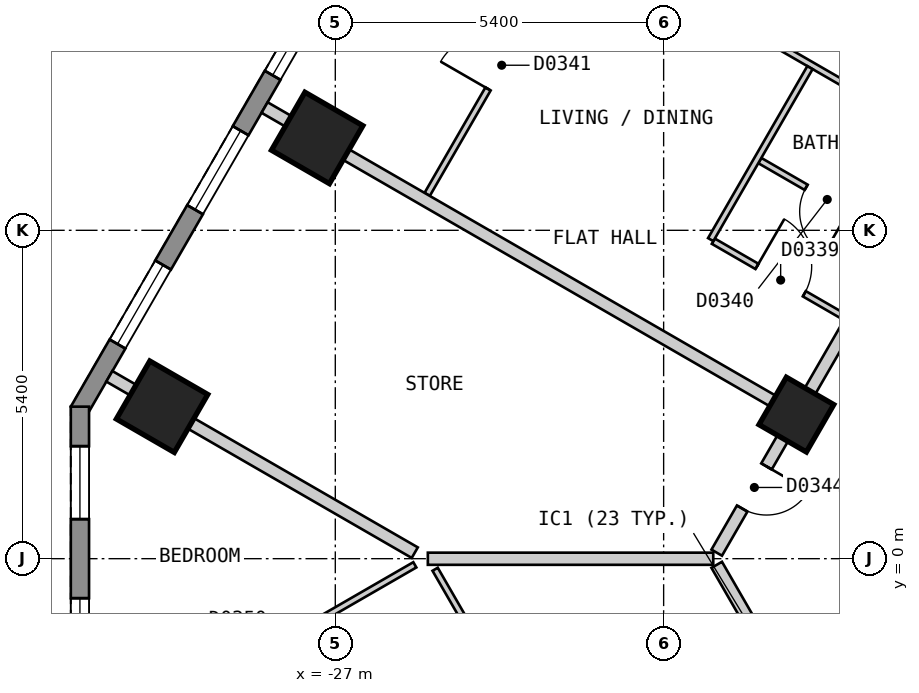
"""IFC4 building model, lengths in metres.
Left out: names, types, materials, properties, quantities, classifications, styles, units other than length and angle.
Written with IfcOpenShell. Run it as: python <this file> out.ifc"""

import sys

from ifc_helpers import new_model, si_unit, direction, frame, frame_2d, origin, origin_2d, place, context, subcontext, project, spatial, polyline, rectangle, outline, extrude, element, fill, save


model = new_model("IFC4")
c1 = context("Model", 3, precision=1e-05, world=origin(), true_north=direction((0.0, 1.0)))
c2 = subcontext(c1, "Body", "Model", "MODEL_VIEW")
j1 = project(units=[si_unit("LENGTHUNIT", "METRE"), si_unit("PLANEANGLEUNIT", "RADIAN")], contexts=[c1])
p1 = place(None, origin())
s1 = spatial("IfcSite", under=j1, at=p1, CompositionType="ELEMENT")
p2 = place(p1, origin())
s2 = spatial("IfcBuilding", under=s1, at=p2, CompositionType="ELEMENT")
p3 = place(p2, frame((0.0, 0.0, 59.4)))
s3 = spatial("IfcBuildingStorey", under=s2, at=p3, CompositionType="ELEMENT", Elevation=59.4)
for number, where, z_axis, x_axis in (
    (1, (-27.298, 6.919, 0.0), (0.0, 0.0, 1.0), (-0.5, -0.866, 0.0)),
    (2, (-29.849, 2.499, 0.0), (0.0, 0.0, 1.0), (-0.5, -0.866, 0.0)),
):
    element("IfcColumn", number, at=place(p3, frame(where, z_axis=z_axis, x_axis=x_axis)), inside=s3, PredefinedType="COLUMN", context=c2, shape_type="SweptSolid", body=[
        extrude(rectangle(XDim=1.1, YDim=1.1, at=origin_2d()), origin(), (0.0, 0.0, 1.0), 3.0),
    ])
p4 = place(p3, frame((-19.417, 2.369, 0.0), z_axis=(0.0, 0.0, 1.0), x_axis=(-0.499984884929, -0.866034130299, 0.0)))
e3 = element("IfcColumn", 3, at=p4, inside=s3, PredefinedType="COLUMN", context=c2, shape_type="SweptSolid", body=[
    extrude(rectangle(XDim=0.9, YDim=0.9, at=origin_2d()), origin(), (0.0, 0.0, 1.0), 3.0),
])
p5 = place(p3, frame((-17.71, 25.825, 0.0), z_axis=(0.0, 0.0, 1.0), x_axis=(-0.500001938803, -0.866024284413, 0.0)))
e4 = element("IfcWall", 4, at=p5, inside=s3, PredefinedType="SOLIDWALL", context=c2, shape_type="SweptSolid", body=[
    extrude(outline(polyline([(0.0, -0.15), (27.02, -0.15), (26.94, 0.15), (0.08, 0.15), (0.0, -0.15)])), origin(), (0.0, 0.0, 1.0), 2.6),
])
p6 = place(p5, frame((1.277, 0.0, 0.15)))
e5 = element("IfcOpeningElement", 5, at=p6, cuts=e4, PredefinedType="OPENING", context=c2, shape_type="SweptSolid", body=[
    extrude(rectangle(XDim=1.5, YDim=2.1, at=frame_2d((0.75, 1.05))), frame((0.0, 0.16, 0.0), z_axis=(0.0, -1.0, 0.0), x_axis=(1.0, 0.0, 0.0)), (0.0, 0.0, 1.0), 0.32),
])
p7 = place(p5, frame((3.829, 0.0, 0.15)))
e6 = element("IfcOpeningElement", 6, at=p7, cuts=e4, PredefinedType="OPENING", context=c2, shape_type="SweptSolid", body=[
    extrude(rectangle(XDim=1.5, YDim=2.1, at=frame_2d((0.75, 1.05))), frame((0.0, 0.16, 0.0), z_axis=(0.0, -1.0, 0.0), x_axis=(1.0, 0.0, 0.0)), (0.0, 0.0, 1.0), 0.32),
])
p8 = place(p5, frame((6.382, 0.0, 0.15)))
e7 = element("IfcOpeningElement", 7, at=p8, cuts=e4, PredefinedType="OPENING", context=c2, shape_type="SweptSolid", body=[
    extrude(rectangle(XDim=1.5, YDim=2.1, at=frame_2d((0.75, 1.05))), frame((0.0, 0.16, 0.0), z_axis=(0.0, -1.0, 0.0), x_axis=(1.0, 0.0, 0.0)), (0.0, 0.0, 1.0), 0.32),
])
p9 = place(p5, frame((8.933, 0.0, 0.15)))
e8 = element("IfcOpeningElement", 8, at=p9, cuts=e4, PredefinedType="OPENING", context=c2, shape_type="SweptSolid", body=[
    extrude(rectangle(XDim=1.5, YDim=2.1, at=frame_2d((0.75, 1.05))), frame((0.0, 0.16, 0.0), z_axis=(0.0, -1.0, 0.0), x_axis=(1.0, 0.0, 0.0)), (0.0, 0.0, 1.0), 0.32),
])
p10 = place(p5, frame((11.485, 0.0, 0.15)))
e9 = element("IfcOpeningElement", 9, at=p10, cuts=e4, PredefinedType="OPENING", context=c2, shape_type="SweptSolid", body=[
    extrude(rectangle(XDim=1.5, YDim=2.1, at=frame_2d((0.75, 1.05))), frame((0.0, 0.16, 0.0), z_axis=(0.0, -1.0, 0.0), x_axis=(1.0, 0.0, 0.0)), (0.0, 0.0, 1.0), 0.32),
])
p11 = place(p5, frame((14.037, 0.0, 0.15)))
e10 = element("IfcOpeningElement", 10, at=p11, cuts=e4, PredefinedType="OPENING", context=c2, shape_type="SweptSolid", body=[
    extrude(rectangle(XDim=1.5, YDim=2.1, at=frame_2d((0.75, 1.05))), frame((0.0, 0.16, 0.0), z_axis=(0.0, -1.0, 0.0), x_axis=(1.0, 0.0, 0.0)), (0.0, 0.0, 1.0), 0.32),
])
p12 = place(p5, frame((16.589, 0.0, 0.15)))
e11 = element("IfcOpeningElement", 11, at=p12, cuts=e4, PredefinedType="OPENING", context=c2, shape_type="SweptSolid", body=[
    extrude(rectangle(XDim=1.5, YDim=2.1, at=frame_2d((0.75, 1.05))), frame((0.0, 0.16, 0.0), z_axis=(0.0, -1.0, 0.0), x_axis=(1.0, 0.0, 0.0)), (0.0, 0.0, 1.0), 0.32),
])
p13 = place(p5, frame((19.141, 0.0, 0.15)))
e12 = element("IfcOpeningElement", 12, at=p13, cuts=e4, PredefinedType="OPENING", context=c2, shape_type="SweptSolid", body=[
    extrude(rectangle(XDim=1.5, YDim=2.1, at=frame_2d((0.75, 1.05))), frame((0.0, 0.16, 0.0), z_axis=(0.0, -1.0, 0.0), x_axis=(1.0, 0.0, 0.0)), (0.0, 0.0, 1.0), 0.32),
])
p14 = place(p5, frame((21.693, 0.0, 0.15)))
e13 = element("IfcOpeningElement", 13, at=p14, cuts=e4, PredefinedType="OPENING", context=c2, shape_type="SweptSolid", body=[
    extrude(rectangle(XDim=1.5, YDim=2.1, at=frame_2d((0.75, 1.05))), frame((0.0, 0.16, 0.0), z_axis=(0.0, -1.0, 0.0), x_axis=(1.0, 0.0, 0.0)), (0.0, 0.0, 1.0), 0.32),
])
p15 = place(p5, frame((24.244, 0.0, 0.15)))
e14 = element("IfcOpeningElement", 14, at=p15, cuts=e4, PredefinedType="OPENING", context=c2, shape_type="SweptSolid", body=[
    extrude(rectangle(XDim=1.5, YDim=2.1, at=frame_2d((0.75, 1.05))), frame((0.0, 0.16, 0.0), z_axis=(0.0, -1.0, 0.0), x_axis=(1.0, 0.0, 0.0)), (0.0, 0.0, 1.0), 0.32),
])
p16 = place(p3, frame((-31.2, 2.5, 0.0), z_axis=(0.0, 0.0, 1.0), x_axis=(0.0, -1.0, 0.0)))
e15 = element("IfcWall", 15, at=p16, inside=s3, PredefinedType="SOLIDWALL", context=c2, shape_type="SweptSolid", body=[
    extrude(outline(polyline([(0.0, -0.15), (5.0, -0.15), (4.92, 0.15), (0.08, 0.15), (0.0, -0.15)])), origin(), (0.0, 0.0, 1.0), 2.6),
])
p17 = place(p16, frame((0.65, 0.0, 0.15)))
e16 = element("IfcOpeningElement", 16, at=p17, cuts=e15, PredefinedType="OPENING", context=c2, shape_type="SweptSolid", body=[
    extrude(rectangle(XDim=1.2, YDim=2.1, at=frame_2d((0.6, 1.05))), frame((0.0, 0.16, 0.0), z_axis=(0.0, -1.0, 0.0), x_axis=(1.0, 0.0, 0.0)), (0.0, 0.0, 1.0), 0.32),
])
p18 = place(p16, frame((3.15, 0.0, 0.15)))
e17 = element("IfcOpeningElement", 17, at=p18, cuts=e15, PredefinedType="OPENING", context=c2, shape_type="SweptSolid", body=[
    extrude(rectangle(XDim=1.2, YDim=2.1, at=frame_2d((0.6, 1.05))), frame((0.0, 0.16, 0.0), z_axis=(0.0, -1.0, 0.0), x_axis=(1.0, 0.0, 0.0)), (0.0, 0.0, 1.0), 0.32),
])
p19 = place(p3, frame((-20.727, -0.101, 0.0), z_axis=(0.0, 0.0, 1.0), x_axis=(0.500049702773, -0.865996705973, 0.0)))
e18 = element("IfcWall", 18, at=p19, inside=s3, PredefinedType="PARTITIONING", context=c2, shape_type="SweptSolid", body=[
    extrude(rectangle(XDim=7.211, YDim=0.2, at=frame_2d((3.605, 0.0))), origin(), (0.0, 0.0, 1.0), 2.6),
])
p20 = place(p19, frame((5.654, 0.0, 0.0)))
e19 = element("IfcOpeningElement", 19, at=p20, cuts=e18, PredefinedType="OPENING", context=c2, shape_type="SweptSolid", body=[
    extrude(rectangle(XDim=1.0, YDim=2.1, at=frame_2d((0.5, 1.05))), frame((0.0, 0.11, 0.0), z_axis=(0.0, -1.0, 0.0), x_axis=(1.0, 0.0, 0.0)), (0.0, 0.0, 1.0), 0.22),
])
p21 = place(p3, frame((-20.727, 0.099, 0.0), z_axis=(0.0, 0.0, 1.0), x_axis=(0.499993204491, 0.866029327138, 0.0)))
e20 = element("IfcWall", 20, at=p21, inside=s3, PredefinedType="PARTITIONING", context=c2, shape_type="SweptSolid", body=[
    extrude(rectangle(XDim=20.554, YDim=0.2, at=frame_2d((10.277, 0.0))), origin(), (0.0, 0.0, 1.0), 2.6),
])
p22 = place(p21, frame((14.88, 0.0, 0.0)))
e21 = element("IfcOpeningElement", 21, at=p22, cuts=e20, PredefinedType="OPENING", context=c2, shape_type="SweptSolid", body=[
    extrude(rectangle(XDim=1.0, YDim=2.1, at=frame_2d((0.5, 1.05))), frame((0.0, 0.11, 0.0), z_axis=(0.0, -1.0, 0.0), x_axis=(1.0, 0.0, 0.0)), (0.0, 0.0, 1.0), 0.22),
])
p23 = place(p21, frame((4.673, 0.0, 0.0)))
e22 = element("IfcOpeningElement", 22, at=p23, cuts=e20, PredefinedType="OPENING", context=c2, shape_type="SweptSolid", body=[
    extrude(rectangle(XDim=1.0, YDim=2.1, at=frame_2d((0.5, 1.05))), frame((0.0, 0.11, 0.0), z_axis=(0.0, -1.0, 0.0), x_axis=(1.0, 0.0, 0.0)), (0.0, 0.0, 1.0), 0.22),
])
p24 = place(p21, frame((0.838, 0.0, 0.0)))
e23 = element("IfcOpeningElement", 23, at=p24, cuts=e20, PredefinedType="OPENING", context=c2, shape_type="SweptSolid", body=[
    extrude(rectangle(XDim=0.8, YDim=2.1, at=frame_2d((0.4, 1.05))), frame((0.0, 0.11, 0.0), z_axis=(0.0, -1.0, 0.0), x_axis=(1.0, 0.0, 0.0)), (0.0, 0.0, 1.0), 0.22),
])
p25 = place(p3, frame((-25.358, -0.174, 0.0), z_axis=(0.0, 0.0, 1.0), x_axis=(0.500093956194, -0.865971151354, 0.0)))
e24 = element("IfcWall", 24, at=p25, inside=s3, PredefinedType="PARTITIONING", context=c2, shape_type="SweptSolid", body=[
    extrude(rectangle(XDim=4.873, YDim=0.1, at=frame_2d((2.437, 0.0))), origin(), (0.0, 0.0, 1.0), 2.6),
])
p26 = place(p25, frame((1.937, 0.0, 0.0)))
e25 = element("IfcOpeningElement", 25, at=p26, cuts=e24, PredefinedType="OPENING", context=c2, shape_type="SweptSolid", body=[
    extrude(rectangle(XDim=0.8, YDim=2.1, at=frame_2d((0.4, 1.05))), frame((0.0, 0.06, 0.0), z_axis=(0.0, -1.0, 0.0), x_axis=(1.0, 0.0, 0.0)), (0.0, 0.0, 1.0), 0.12),
])
p27 = place(p3, frame((-20.018, 6.547, 0.0), z_axis=(0.0, 0.0, 1.0), x_axis=(0.866038211682, -0.499977815414, 0.0)))
e26 = element("IfcWall", 26, at=p27, inside=s3, PredefinedType="PARTITIONING", context=c2, shape_type="SweptSolid", body=[
    extrude(rectangle(XDim=2.51, YDim=0.1, at=frame_2d((1.255, 0.0))), origin(), (0.0, 0.0, 1.0), 2.6),
])
p28 = place(p27, frame((0.88, 0.0, 0.0)))
e27 = element("IfcOpeningElement", 27, at=p28, cuts=e26, PredefinedType="OPENING", context=c2, shape_type="SweptSolid", body=[
    extrude(rectangle(XDim=0.8, YDim=2.1, at=frame_2d((0.4, 1.05))), frame((0.0, 0.06, 0.0), z_axis=(0.0, -1.0, 0.0), x_axis=(1.0, 0.0, 0.0)), (0.0, 0.0, 1.0), 0.12),
])
p29 = place(p3, frame((-20.783, 5.221, 0.0), z_axis=(0.0, 0.0, 1.0), x_axis=(0.865958718457, -0.500115484592, 0.0)))
e28 = element("IfcWall", 28, at=p29, inside=s3, PredefinedType="PARTITIONING", context=c2, shape_type="SweptSolid", body=[
    extrude(rectangle(XDim=2.509, YDim=0.1, at=frame_2d((1.255, 0.0))), origin(), (0.0, 0.0, 1.0), 2.6),
])
p30 = place(p29, frame((0.829, 0.0, 0.0)))
e29 = element("IfcOpeningElement", 29, at=p30, cuts=e28, PredefinedType="OPENING", context=c2, shape_type="SweptSolid", body=[
    extrude(rectangle(XDim=0.9, YDim=2.1, at=frame_2d((0.45, 1.05))), frame((0.0, 0.06, 0.0), z_axis=(0.0, -1.0, 0.0), x_axis=(1.0, 0.0, 0.0)), (0.0, 0.0, 1.0), 0.12),
])
p31 = place(p3, frame((-25.611, 11.839, 0.0), z_axis=(0.0, 0.0, 1.0), x_axis=(0.866022959057, -0.500004234368, 0.0)))
e30 = element("IfcWall", 30, at=p31, inside=s3, PredefinedType="PARTITIONING", context=c2, shape_type="SweptSolid", body=[
    extrude(rectangle(XDim=10.0, YDim=0.1, at=frame_2d((5.0, 0.0))), origin(), (0.0, 0.0, 1.0), 2.6),
])
p32 = place(p31, frame((4.305, 0.0, 0.0)))
e31 = element("IfcOpeningElement", 31, at=p32, cuts=e30, PredefinedType="OPENING", context=c2, shape_type="SweptSolid", body=[
    extrude(rectangle(XDim=0.9, YDim=2.1, at=frame_2d((0.45, 1.05))), frame((0.0, 0.06, 0.0), z_axis=(0.0, -1.0, 0.0), x_axis=(1.0, 0.0, 0.0)), (0.0, 0.0, 1.0), 0.12),
])
p33 = place(p3, frame((-20.826, 5.247, 0.0), z_axis=(0.0, 0.0, 1.0), x_axis=(0.499806605897, 0.866137031134, 0.0)))
e32 = element("IfcWall", 32, at=p33, inside=s3, PredefinedType="PARTITIONING", context=c2, shape_type="SweptSolid", body=[
    extrude(rectangle(XDim=3.265, YDim=0.1, at=frame_2d((1.632, 0.0))), origin(), (0.0, 0.0, 1.0), 2.6),
])
p34 = place(p3, frame((-25.489, 5.991, 0.0), z_axis=(0.0, 0.0, 1.0), x_axis=(0.499881743012, 0.866093668724, 0.0)))
e33 = element("IfcWall", 33, at=p34, inside=s3, PredefinedType="PARTITIONING", context=c2, shape_type="SweptSolid", body=[
    extrude(rectangle(XDim=4.953, YDim=0.1, at=frame_2d((2.477, 0.0))), origin(), (0.0, 0.0, 1.0), 2.6),
])
p35 = place(p34, frame((2.002, 0.0, 0.0)))
e34 = element("IfcOpeningElement", 34, at=p35, cuts=e33, PredefinedType="OPENING", context=c2, shape_type="SweptSolid", body=[
    extrude(rectangle(XDim=0.9, YDim=2.1, at=frame_2d((0.45, 1.05))), frame((0.0, 0.06, 0.0), z_axis=(0.0, -1.0, 0.0), x_axis=(1.0, 0.0, 0.0)), (0.0, 0.0, 1.0), 0.12),
])
p36 = place(p3, frame((-30.715, -3.0, 0.0), z_axis=(0.0, 0.0, 1.0), x_axis=(0.866116197112, 0.49984270836, 0.0)))
e35 = element("IfcWall", 35, at=p36, inside=s3, PredefinedType="PARTITIONING", context=c2, shape_type="SweptSolid", body=[
    extrude(rectangle(XDim=5.8, YDim=0.1, at=frame_2d((2.9, 0.0))), origin(), (0.0, 0.0, 1.0), 2.6),
])
p37 = place(p36, frame((2.55, 0.0, 0.0)))
e36 = element("IfcOpeningElement", 36, at=p37, cuts=e35, PredefinedType="OPENING", context=c2, shape_type="SweptSolid", body=[
    extrude(rectangle(XDim=0.9, YDim=2.1, at=frame_2d((0.45, 1.05))), frame((0.0, 0.06, 0.0), z_axis=(0.0, -1.0, 0.0), x_axis=(1.0, 0.0, 0.0)), (0.0, 0.0, 1.0), 0.12),
])
p38 = place(p3, frame((-28.163, 7.419, 0.0), z_axis=(0.0, 0.0, 1.0), x_axis=(0.866022959057, -0.500004234368, 0.0)))
e37 = element("IfcWall", 37, at=p38, inside=s3, PredefinedType="PARTITIONING", context=c2, shape_type="SweptSolid", body=[
    extrude(rectangle(XDim=10.0, YDim=0.2, at=frame_2d((5.0, 0.0))), origin(), (0.0, 0.0, 1.0), 2.6),
])
p39 = place(p3, frame((-30.716, 2.999, 0.0), z_axis=(0.0, 0.0, 1.0), x_axis=(0.866032775405, -0.499987231761, 0.0)))
e38 = element("IfcWall", 38, at=p39, inside=s3, PredefinedType="PARTITIONING", context=c2, shape_type="SweptSolid", body=[
    extrude(rectangle(XDim=5.8, YDim=0.2, at=frame_2d((2.9, 0.0))), origin(), (0.0, 0.0, 1.0), 2.6),
])
p40 = place(p3, frame((-25.478, -0.001, 0.0), z_axis=(0.0, 0.0, 1.0), x_axis=(1.0, 0.0, 0.0)))
e39 = element("IfcWall", 39, at=p40, inside=s3, PredefinedType="PARTITIONING", context=c2, shape_type="SweptSolid", body=[
    extrude(rectangle(XDim=4.694, YDim=0.2, at=frame_2d((2.347, 0.0))), origin(), (0.0, 0.0, 1.0), 2.6),
])
p41 = place(p13, origin())
e40 = element("IfcWindow", 40, at=p41, inside=s3, PartitioningType="SINGLE_PANEL", PredefinedType="WINDOW", context=c2, shape_type="SweptSolid", body=[
    extrude(rectangle(XDim=1.5, YDim=2.1, at=frame_2d((0.75, 1.05))), frame((0.0, 0.03, 0.0), z_axis=(0.0, -1.0, 0.0), x_axis=(1.0, 0.0, 0.0)), (0.0, 0.0, 1.0), 0.06),
])
fill(e12, e40)
p42 = place(p14, origin())
e41 = element("IfcWindow", 41, at=p42, inside=s3, PartitioningType="SINGLE_PANEL", PredefinedType="WINDOW", context=c2, shape_type="SweptSolid", body=[
    extrude(rectangle(XDim=1.5, YDim=2.1, at=frame_2d((0.75, 1.05))), frame((0.0, 0.03, 0.0), z_axis=(0.0, -1.0, 0.0), x_axis=(1.0, 0.0, 0.0)), (0.0, 0.0, 1.0), 0.06),
])
fill(e13, e41)
p43 = place(p15, origin())
e42 = element("IfcWindow", 42, at=p43, inside=s3, PartitioningType="SINGLE_PANEL", PredefinedType="WINDOW", context=c2, shape_type="SweptSolid", body=[
    extrude(rectangle(XDim=1.5, YDim=2.1, at=frame_2d((0.75, 1.05))), frame((0.0, 0.03, 0.0), z_axis=(0.0, -1.0, 0.0), x_axis=(1.0, 0.0, 0.0)), (0.0, 0.0, 1.0), 0.06),
])
fill(e14, e42)
p44 = place(p17, origin())
e43 = element("IfcWindow", 43, at=p44, inside=s3, PartitioningType="SINGLE_PANEL", PredefinedType="WINDOW", context=c2, shape_type="SweptSolid", body=[
    extrude(rectangle(XDim=1.2, YDim=2.1, at=frame_2d((0.6, 1.05))), frame((0.0, 0.03, 0.0), z_axis=(0.0, -1.0, 0.0), x_axis=(1.0, 0.0, 0.0)), (0.0, 0.0, 1.0), 0.06),
])
fill(e16, e43)
p45 = place(p18, origin())
e44 = element("IfcWindow", 44, at=p45, inside=s3, PartitioningType="SINGLE_PANEL", PredefinedType="WINDOW", context=c2, shape_type="SweptSolid", body=[
    extrude(rectangle(XDim=1.2, YDim=2.1, at=frame_2d((0.6, 1.05))), frame((0.0, 0.03, 0.0), z_axis=(0.0, -1.0, 0.0), x_axis=(1.0, 0.0, 0.0)), (0.0, 0.0, 1.0), 0.06),
])
fill(e17, e44)
p46 = place(p30, origin())
e45 = element("IfcDoor", 45, at=p46, inside=s3, OperationType="SINGLE_SWING_LEFT", PredefinedType="DOOR", context=c2, shape_type="SweptSolid", body=[
    extrude(rectangle(XDim=0.9, YDim=2.1, at=frame_2d((0.45, 1.05))), frame((0.0, 0.025, 0.0), z_axis=(0.0, -1.0, 0.0), x_axis=(1.0, 0.0, 0.0)), (0.0, 0.0, 1.0), 0.05),
])
fill(e29, e45)
p47 = place(p28, origin())
e46 = element("IfcDoor", 46, at=p47, inside=s3, OperationType="SINGLE_SWING_RIGHT", PredefinedType="DOOR", context=c2, shape_type="SweptSolid", body=[
    extrude(rectangle(XDim=0.8, YDim=2.1, at=frame_2d((0.4, 1.05))), frame((0.0, 0.025, 0.0), z_axis=(0.0, -1.0, 0.0), x_axis=(1.0, 0.0, 0.0)), (0.0, 0.0, 1.0), 0.05),
])
fill(e27, e46)
p48 = place(p35, origin())
e47 = element("IfcDoor", 47, at=p48, inside=s3, OperationType="SINGLE_SWING_LEFT", PredefinedType="DOOR", context=c2, shape_type="SweptSolid", body=[
    extrude(rectangle(XDim=0.9, YDim=2.1, at=frame_2d((0.45, 1.05))), frame((0.0, 0.025, 0.0), z_axis=(0.0, -1.0, 0.0), x_axis=(1.0, 0.0, 0.0)), (0.0, 0.0, 1.0), 0.05),
])
fill(e34, e47)
p49 = place(p24, origin())
e48 = element("IfcDoor", 48, at=p49, inside=s3, OperationType="SINGLE_SWING_RIGHT", PredefinedType="DOOR", context=c2, shape_type="SweptSolid", body=[
    extrude(rectangle(XDim=0.8, YDim=2.1, at=frame_2d((0.4, 1.05))), frame((0.0, 0.025, 0.0), z_axis=(0.0, -1.0, 0.0), x_axis=(1.0, 0.0, 0.0)), (0.0, 0.0, 1.0), 0.05),
])
fill(e23, e48)
save(model, sys.argv[1])
